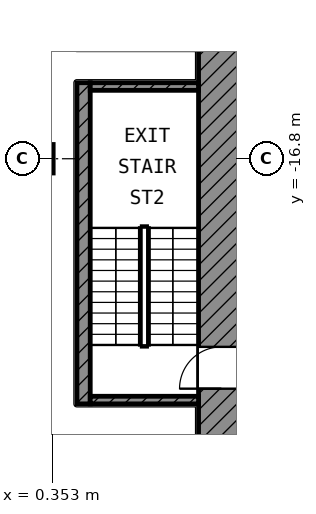
"""IFC4 building model, lengths in metres.
Left out: names, types, materials, properties, quantities, classifications, styles, units other than length and angle.
Written with IfcOpenShell. Run it as: python <this file> out.ifc"""

import sys

from ifc_helpers import new_model, si_unit, direction, frame, frame_2d, origin, origin_2d, place, context, subcontext, project, spatial, rectangle, extrude, element, fill, save


model = new_model("IFC4")
c1 = context("Model", 3, precision=1e-05, world=origin(), true_north=direction((0.0, 1.0)))
c2 = subcontext(c1, "Body", "Model", "MODEL_VIEW")
j1 = project(units=[si_unit("LENGTHUNIT", "METRE"), si_unit("PLANEANGLEUNIT", "RADIAN")], contexts=[c1])
p1 = place(None, origin())
s1 = spatial("IfcSite", under=j1, at=p1, CompositionType="ELEMENT")
p2 = place(p1, origin())
s2 = spatial("IfcBuilding", under=s1, at=p2, CompositionType="ELEMENT")
p3 = place(p2, frame((0.0, 0.0, 286.0)))
s3 = spatial("IfcBuildingStorey", under=s2, at=p3, CompositionType="ELEMENT", Elevation=286.0)
p4 = place(p3, frame((0.0, -16.8, 0.0), z_axis=(0.0, 0.0, 1.0), x_axis=(1.0, 0.0, 0.0)))
e1 = element("IfcColumn", 1, at=p4, inside=s3, PredefinedType="COLUMN", context=c2, shape_type="SweptSolid", body=[
    extrude(rectangle(XDim=0.75, YDim=0.75, at=origin_2d()), origin(), (0.0, 0.0, 1.0), 4.2),
])
p5 = place(p3, frame((4.8, -24.7, 0.0), z_axis=(0.0, 0.0, 1.0), x_axis=(0.0, 1.0, 0.0)))
e2 = element("IfcWall", 2, at=p5, inside=s3, PredefinedType="SHEAR", context=c2, shape_type="SweptSolid", body=[
    extrude(rectangle(XDim=19.3, YDim=1.2, at=frame_2d((9.65, 0.0))), origin(), (0.0, 0.0, 1.0), 3.6),
])
p6 = place(p5, frame((11.15, 0.0, 0.0)))
e3 = element("IfcOpeningElement", 3, at=p6, cuts=e2, PredefinedType="OPENING", context=c2, shape_type="SweptSolid", body=[
    extrude(rectangle(XDim=1.1, YDim=2.1, at=frame_2d((0.55, 1.05))), frame((0.0, 0.61, 0.0), z_axis=(0.0, -1.0, 0.0), x_axis=(1.0, 0.0, 0.0)), (0.0, 0.0, 1.0), 1.22),
])
p7 = place(p5, frame((1.85, 0.0, 0.0)))
e4 = element("IfcOpeningElement", 4, at=p7, cuts=e2, PredefinedType="OPENING", context=c2, shape_type="SweptSolid", body=[
    extrude(rectangle(XDim=1.1, YDim=2.1, at=frame_2d((0.55, 1.05))), frame((0.0, 0.61, 0.0), z_axis=(0.0, -1.0, 0.0), x_axis=(1.0, 0.0, 0.0)), (0.0, 0.0, 1.0), 1.22),
])
p8 = place(p3, frame((1.175, -23.25, 0.0), z_axis=(0.0, 0.0, 1.0), x_axis=(0.0, 1.0, 0.0)))
e5 = element("IfcWall", 5, at=p8, inside=s3, PredefinedType="SHEAR", context=c2, shape_type="SweptSolid", body=[
    extrude(rectangle(XDim=8.45, YDim=0.35, at=frame_2d((4.225, 0.0))), origin(), (0.0, 0.0, 1.0), 3.6),
])
for number, where, z_axis, x_axis in (
    (6, (1.35, -14.9, 0.0), (0.0, 0.0, 1.0), (1.0, 0.0, 0.0)),
    (7, (1.35, -23.15, 0.0), (0.0, 0.0, 1.0), (1.0, 0.0, 0.0)),
):
    element("IfcWall", number, at=place(p3, frame(where, z_axis=z_axis, x_axis=x_axis)), inside=s3, PredefinedType="SHEAR", context=c2, shape_type="SweptSolid", body=[
        extrude(rectangle(XDim=2.85, YDim=0.2, at=frame_2d((1.425, 0.0))), origin(), (0.0, 0.0, 1.0), 3.6),
    ])
p9 = place(p7, origin())
e8 = element("IfcDoor", 8, at=p9, inside=s3, OperationType="SINGLE_SWING_LEFT", PredefinedType="DOOR", context=c2, shape_type="SweptSolid", body=[
    extrude(rectangle(XDim=1.1, YDim=2.1, at=frame_2d((0.55, 1.05))), frame((0.0, 0.025, 0.0), z_axis=(0.0, -1.0, 0.0), x_axis=(1.0, 0.0, 0.0)), (0.0, 0.0, 1.0), 0.05),
])
fill(e4, e8)
save(model, sys.argv[1])
